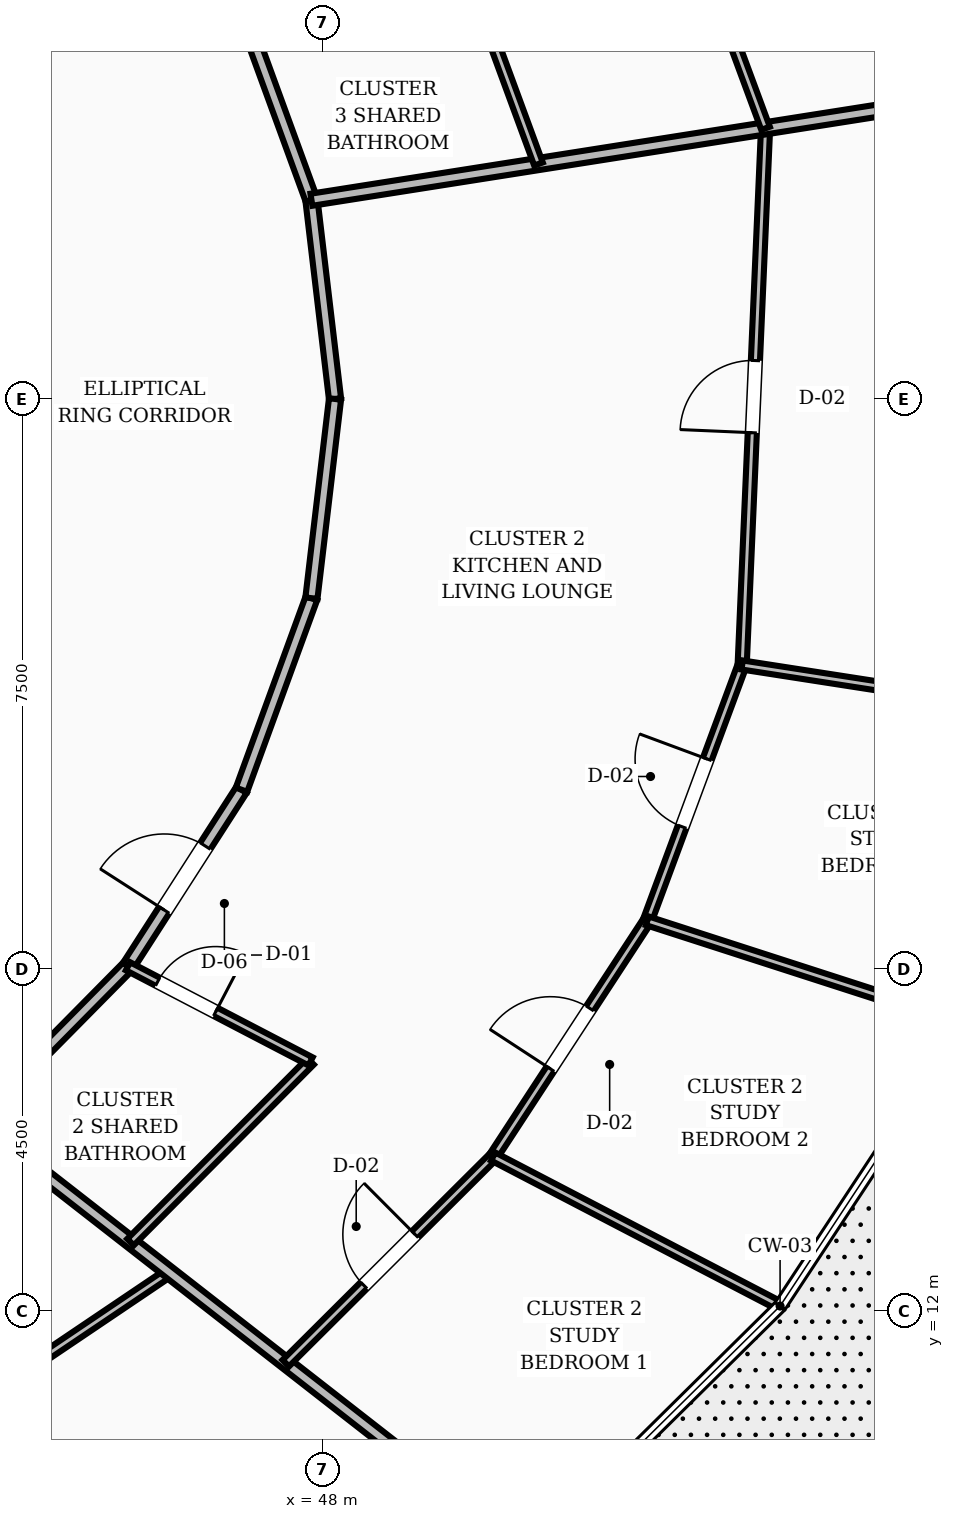
"""IFC4 building model, lengths in metres.
Left out: names, types, materials, properties, quantities, classifications, styles, units other than length and angle.
Written with IfcOpenShell. Run it as: python <this file> out.ifc"""

import sys

from ifc_helpers import new_model, si_unit, direction, frame, frame_2d, origin, place, context, subcontext, project, spatial, rectangle, extrude, element, fill, save


model = new_model("IFC4")
c1 = context("Model", 3, precision=1e-05, world=origin(), true_north=direction((0.0, 1.0)))
c2 = subcontext(c1, "Body", "Model", "MODEL_VIEW")
j1 = project(units=[si_unit("LENGTHUNIT", "METRE"), si_unit("PLANEANGLEUNIT", "RADIAN")], contexts=[c1])
p1 = place(None, origin())
s1 = spatial("IfcSite", under=j1, at=p1, CompositionType="ELEMENT")
p2 = place(p1, origin())
s2 = spatial("IfcBuilding", under=s1, at=p2, CompositionType="ELEMENT")
p3 = place(p2, frame((0.0, 0.0, 80.8)))
s3 = spatial("IfcBuildingStorey", under=s2, at=p3, CompositionType="ELEMENT", Elevation=80.8)
p4 = place(p3, frame((48.162, 24.0, 0.0), z_axis=(0.0, 0.0, 1.0), x_axis=(-0.117667763342, 0.993053018459, 0.0)))
e1 = element("IfcWall", 1, at=p4, inside=s3, PredefinedType="SOLIDWALL", context=c2, shape_type="SweptSolid", body=[
    extrude(rectangle(XDim=2.639, YDim=0.16, at=frame_2d((1.32, 0.0))), origin(), (0.0, 0.0, 1.0), 2.71),
])
p5 = place(p3, frame((47.852, 26.621, 0.0), z_axis=(0.0, 0.0, 1.0), x_axis=(-0.342882618672, 0.939378257047, 0.0)))
e2 = element("IfcWall", 2, at=p5, inside=s3, PredefinedType="SOLIDWALL", context=c2, shape_type="SweptSolid", body=[
    extrude(rectangle(XDim=2.683, YDim=0.16, at=frame_2d((1.341, 0.0))), origin(), (0.0, 0.0, 1.0), 2.71),
])
p6 = place(p3, frame((43.428, 14.501, 0.0), z_axis=(0.0, 0.0, 1.0), x_axis=(0.702569520063, 0.711615113301, 0.0)))
e3 = element("IfcWall", 3, at=p6, inside=s3, PredefinedType="SOLIDWALL", context=c2, shape_type="SweptSolid", body=[
    extrude(rectangle(XDim=2.861, YDim=0.16, at=frame_2d((1.43, 0.0))), origin(), (0.0, 0.0, 1.0), 2.71),
])
p7 = place(p3, frame((45.438, 16.537, 0.0), z_axis=(0.0, 0.0, 1.0), x_axis=(0.540891657444, 0.841092274907, 0.0)))
e4 = element("IfcWall", 4, at=p7, inside=s3, PredefinedType="SOLIDWALL", context=c2, shape_type="SweptSolid", body=[
    extrude(rectangle(XDim=2.761, YDim=0.16, at=frame_2d((1.38, 0.0))), origin(), (0.0, 0.0, 1.0), 2.71),
])
p8 = place(p7, frame((0.881, 0.0, 0.0)))
e5 = element("IfcOpeningElement", 5, at=p8, cuts=e4, PredefinedType="OPENING", context=c2, shape_type="SweptSolid", body=[
    extrude(rectangle(XDim=1.0, YDim=2.1, at=frame_2d((0.5, 1.05))), frame((0.0, 0.09, 0.0), z_axis=(0.0, -1.0, 0.0), x_axis=(1.0, 0.0, 0.0)), (0.0, 0.0, 1.0), 0.18),
])
p9 = place(p3, frame((46.932, 18.859, 0.0), z_axis=(0.0, 0.0, 1.0), x_axis=(0.342882618672, 0.939378257047, 0.0)))
e6 = element("IfcWall", 6, at=p9, inside=s3, PredefinedType="SOLIDWALL", context=c2, shape_type="SweptSolid", body=[
    extrude(rectangle(XDim=2.683, YDim=0.16, at=frame_2d((1.341, 0.0))), origin(), (0.0, 0.0, 1.0), 2.71),
])
p10 = place(p3, frame((47.852, 21.379, 0.0), z_axis=(0.0, 0.0, 1.0), x_axis=(0.117667763342, 0.993053018459, 0.0)))
e7 = element("IfcWall", 7, at=p10, inside=s3, PredefinedType="SOLIDWALL", context=c2, shape_type="SweptSolid", body=[
    extrude(rectangle(XDim=2.639, YDim=0.16, at=frame_2d((1.32, 0.0))), origin(), (0.0, 0.0, 1.0), 2.71),
])
p11 = place(p3, frame((42.985, 10.489, 0.0), z_axis=(0.0, 0.0, 1.0), x_axis=(0.829066303205, 0.55915030617, 0.0)))
e8 = element("IfcWall", 8, at=p11, inside=s3, PredefinedType="PARTITIONING", context=c2, shape_type="SweptSolid", body=[
    extrude(rectangle(XDim=3.615, YDim=0.12, at=frame_2d((1.807, 0.0))), origin(), (0.0, 0.0, 1.0), 2.71),
])
p12 = place(p3, frame((43.428, 14.501, 0.0), z_axis=(0.0, 0.0, 1.0), x_axis=(0.788578725625, -0.614933812285, 0.0)))
e9 = element("IfcWall", 9, at=p12, inside=s3, PredefinedType="SOLIDWALL", context=c2, shape_type="SweptSolid", body=[
    extrude(rectangle(XDim=9.202, YDim=0.16, at=frame_2d((4.601, 0.0))), origin(), (0.0, 0.0, 1.0), 2.71),
])
p13 = place(p3, frame((45.471, 12.908, 0.0), z_axis=(0.0, 0.0, 1.0), x_axis=(0.705905490377, 0.708306034604, 0.0)))
e10 = element("IfcWall", 10, at=p13, inside=s3, PredefinedType="PARTITIONING", context=c2, shape_type="SweptSolid", body=[
    extrude(rectangle(XDim=3.356, YDim=0.12, at=frame_2d((1.678, 0.0))), origin(), (0.0, 0.0, 1.0), 2.71),
])
p14 = place(p3, frame((45.438, 16.537, 0.0), z_axis=(0.0, 0.0, 1.0), x_axis=(0.886820978736, -0.462113137309, 0.0)))
e11 = element("IfcWall", 11, at=p14, inside=s3, PredefinedType="PARTITIONING", context=c2, shape_type="SweptSolid", body=[
    extrude(rectangle(XDim=2.709, YDim=0.12, at=frame_2d((1.354, 0.0))), origin(), (0.0, 0.0, 1.0), 2.71),
])
p15 = place(p14, frame((0.44, 0.0, 0.0)))
e12 = element("IfcOpeningElement", 12, at=p15, cuts=e11, PredefinedType="OPENING", context=c2, shape_type="SweptSolid", body=[
    extrude(rectangle(XDim=0.86, YDim=2.1, at=frame_2d((0.43, 1.05))), frame((0.0, 0.07, 0.0), z_axis=(0.0, -1.0, 0.0), x_axis=(1.0, 0.0, 0.0)), (0.0, 0.0, 1.0), 0.14),
])
p16 = place(p3, frame((47.514, 11.315, 0.0), z_axis=(0.0, 0.0, 1.0), x_axis=(0.708405005875, 0.705806168613, 0.0)))
e13 = element("IfcWall", 13, at=p16, inside=s3, PredefinedType="PARTITIONING", context=c2, shape_type="SweptSolid", body=[
    extrude(rectangle(XDim=3.852, YDim=0.12, at=frame_2d((1.926, 0.0))), origin(), (0.0, 0.0, 1.0), 2.71),
])
p17 = place(p16, frame((1.451, 0.0, 0.0)))
e14 = element("IfcOpeningElement", 14, at=p17, cuts=e13, PredefinedType="OPENING", context=c2, shape_type="SweptSolid", body=[
    extrude(rectangle(XDim=0.95, YDim=2.1, at=frame_2d((0.475, 1.05))), frame((0.0, 0.07, 0.0), z_axis=(0.0, -1.0, 0.0), x_axis=(1.0, 0.0, 0.0)), (0.0, 0.0, 1.0), 0.14),
])
p18 = place(p3, frame((50.242, 14.033, 0.0), z_axis=(0.0, 0.0, 1.0), x_axis=(0.547181905029, 0.837013717217, 0.0)))
e15 = element("IfcWall", 15, at=p18, inside=s3, PredefinedType="PARTITIONING", context=c2, shape_type="SweptSolid", body=[
    extrude(rectangle(XDim=3.706, YDim=0.12, at=frame_2d((1.853, 0.0))), origin(), (0.0, 0.0, 1.0), 2.71),
])
p19 = place(p18, frame((1.378, 0.0, 0.0)))
e16 = element("IfcOpeningElement", 16, at=p19, cuts=e15, PredefinedType="OPENING", context=c2, shape_type="SweptSolid", body=[
    extrude(rectangle(XDim=0.95, YDim=2.1, at=frame_2d((0.475, 1.05))), frame((0.0, 0.07, 0.0), z_axis=(0.0, -1.0, 0.0), x_axis=(1.0, 0.0, 0.0)), (0.0, 0.0, 1.0), 0.14),
])
p20 = place(p3, frame((50.242, 14.033, 0.0), z_axis=(0.0, 0.0, 1.0), x_axis=(0.886850665811, -0.462056161684, 0.0)))
e17 = element("IfcWall", 17, at=p20, inside=s3, PredefinedType="PARTITIONING", context=c2, shape_type="SweptSolid", body=[
    extrude(rectangle(XDim=4.207, YDim=0.12, at=frame_2d((2.103, 0.0))), origin(), (0.0, 0.0, 1.0), 2.71),
])
p21 = place(p3, frame((52.27, 17.135, 0.0), z_axis=(0.0, 0.0, 1.0), x_axis=(0.347819358627, 0.937561567986, 0.0)))
e18 = element("IfcWall", 18, at=p21, inside=s3, PredefinedType="PARTITIONING", context=c2, shape_type="SweptSolid", body=[
    extrude(rectangle(XDim=3.59, YDim=0.12, at=frame_2d((1.795, 0.0))), origin(), (0.0, 0.0, 1.0), 2.71),
])
p22 = place(p21, frame((1.32, 0.0, 0.0)))
e19 = element("IfcOpeningElement", 19, at=p22, cuts=e18, PredefinedType="OPENING", context=c2, shape_type="SweptSolid", body=[
    extrude(rectangle(XDim=0.95, YDim=2.1, at=frame_2d((0.475, 1.05))), frame((0.0, 0.07, 0.0), z_axis=(0.0, -1.0, 0.0), x_axis=(1.0, 0.0, 0.0)), (0.0, 0.0, 1.0), 0.14),
])
p23 = place(p3, frame((52.27, 17.135, 0.0), z_axis=(0.0, 0.0, 1.0), x_axis=(0.951594494346, -0.307356337709, 0.0)))
e20 = element("IfcWall", 20, at=p23, inside=s3, PredefinedType="PARTITIONING", context=c2, shape_type="SweptSolid", body=[
    extrude(rectangle(XDim=4.358, YDim=0.12, at=frame_2d((2.179, 0.0))), origin(), (0.0, 0.0, 1.0), 2.71),
])
p24 = place(p3, frame((53.519, 20.5, 0.0), z_axis=(0.0, 0.0, 1.0), x_axis=(0.043525670249, 0.999052308956, 0.0)))
e21 = element("IfcWall", 21, at=p24, inside=s3, PredefinedType="PARTITIONING", context=c2, shape_type="SweptSolid", body=[
    extrude(rectangle(XDim=7.067, YDim=0.12, at=frame_2d((3.534, 0.0))), origin(), (0.0, 0.0, 1.0), 2.71),
])
p25 = place(p24, frame((3.059, 0.0, 0.0)))
e22 = element("IfcOpeningElement", 22, at=p25, cuts=e21, PredefinedType="OPENING", context=c2, shape_type="SweptSolid", body=[
    extrude(rectangle(XDim=0.95, YDim=2.1, at=frame_2d((0.475, 1.05))), frame((0.0, 0.07, 0.0), z_axis=(0.0, -1.0, 0.0), x_axis=(1.0, 0.0, 0.0)), (0.0, 0.0, 1.0), 0.14),
])
p26 = place(p3, frame((53.519, 20.5, 0.0), z_axis=(0.0, 0.0, 1.0), x_axis=(0.988179628111, -0.153300432438, 0.0)))
e23 = element("IfcWall", 23, at=p26, inside=s3, PredefinedType="PARTITIONING", context=c2, shape_type="SweptSolid", body=[
    extrude(rectangle(XDim=4.456, YDim=0.12, at=frame_2d((2.228, 0.0))), origin(), (0.0, 0.0, 1.0), 2.71),
])
p27 = place(p3, frame((47.852, 26.621, 0.0), z_axis=(0.0, 0.0, 1.0), x_axis=(0.987843119508, 0.155454080811, 0.0)))
e24 = element("IfcWall", 24, at=p27, inside=s3, PredefinedType="SOLIDWALL", context=c2, shape_type="SweptSolid", body=[
    extrude(rectangle(XDim=10.75, YDim=0.16, at=frame_2d((5.375, 0.0))), origin(), (0.0, 0.0, 1.0), 2.71),
])
p28 = place(p3, frame((50.839, 27.091, 0.0), z_axis=(0.0, 0.0, 1.0), x_axis=(-0.34521944279, 0.938521995651, 0.0)))
e25 = element("IfcWall", 25, at=p28, inside=s3, PredefinedType="PARTITIONING", context=c2, shape_type="SweptSolid", body=[
    extrude(rectangle(XDim=3.167, YDim=0.12, at=frame_2d((1.583, 0.0))), origin(), (0.0, 0.0, 1.0), 2.71),
])
p29 = place(p3, frame((53.826, 27.561, 0.0), z_axis=(0.0, 0.0, 1.0), x_axis=(-0.346876529869, 0.937910802276, 0.0)))
e26 = element("IfcWall", 26, at=p29, inside=s3, PredefinedType="PARTITIONING", context=c2, shape_type="SweptSolid", body=[
    extrude(rectangle(XDim=3.651, YDim=0.12, at=frame_2d((1.825, 0.0))), origin(), (0.0, 0.0, 1.0), 2.71),
])
p30 = place(p29, frame((1.35, 0.0, 0.0)))
e27 = element("IfcOpeningElement", 27, at=p30, cuts=e26, PredefinedType="OPENING", context=c2, shape_type="SweptSolid", body=[
    extrude(rectangle(XDim=0.95, YDim=2.1, at=frame_2d((0.475, 1.05))), frame((0.0, 0.07, 0.0), z_axis=(0.0, -1.0, 0.0), x_axis=(1.0, 0.0, 0.0)), (0.0, 0.0, 1.0), 0.14),
])
p31 = place(p15, origin())
e28 = element("IfcDoor", 28, at=p31, inside=s3, OperationType="SINGLE_SWING_RIGHT", PredefinedType="DOOR", context=c2, shape_type="SweptSolid", body=[
    extrude(rectangle(XDim=0.86, YDim=2.1, at=frame_2d((0.43, 1.05))), frame((0.0, 0.025, 0.0), z_axis=(0.0, -1.0, 0.0), x_axis=(1.0, 0.0, 0.0)), (0.0, 0.0, 1.0), 0.05),
])
fill(e12, e28)
p32 = place(p8, origin())
e29 = element("IfcDoor", 29, at=p32, inside=s3, OperationType="SINGLE_SWING_LEFT", PredefinedType="DOOR", context=c2, shape_type="SweptSolid", body=[
    extrude(rectangle(XDim=1.0, YDim=2.1, at=frame_2d((0.5, 1.05))), frame((0.0, 0.025, 0.0), z_axis=(0.0, -1.0, 0.0), x_axis=(1.0, 0.0, 0.0)), (0.0, 0.0, 1.0), 0.05),
])
fill(e5, e29)
p33 = place(p17, origin())
e30 = element("IfcDoor", 30, at=p33, inside=s3, OperationType="SINGLE_SWING_RIGHT", PredefinedType="DOOR", context=c2, shape_type="SweptSolid", body=[
    extrude(rectangle(XDim=0.95, YDim=2.1, at=frame_2d((0.475, 1.05))), frame((0.0, 0.025, 0.0), z_axis=(0.0, -1.0, 0.0), x_axis=(1.0, 0.0, 0.0)), (0.0, 0.0, 1.0), 0.05),
])
fill(e14, e30)
p34 = place(p19, origin())
e31 = element("IfcDoor", 31, at=p34, inside=s3, OperationType="SINGLE_SWING_LEFT", PredefinedType="DOOR", context=c2, shape_type="SweptSolid", body=[
    extrude(rectangle(XDim=0.95, YDim=2.1, at=frame_2d((0.475, 1.05))), frame((0.0, 0.025, 0.0), z_axis=(0.0, -1.0, 0.0), x_axis=(1.0, 0.0, 0.0)), (0.0, 0.0, 1.0), 0.05),
])
fill(e16, e31)
p35 = place(p22, origin())
e32 = element("IfcDoor", 32, at=p35, inside=s3, OperationType="SINGLE_SWING_RIGHT", PredefinedType="DOOR", context=c2, shape_type="SweptSolid", body=[
    extrude(rectangle(XDim=0.95, YDim=2.1, at=frame_2d((0.475, 1.05))), frame((0.0, 0.025, 0.0), z_axis=(0.0, -1.0, 0.0), x_axis=(1.0, 0.0, 0.0)), (0.0, 0.0, 1.0), 0.05),
])
fill(e19, e32)
p36 = place(p25, origin())
e33 = element("IfcDoor", 33, at=p36, inside=s3, OperationType="SINGLE_SWING_LEFT", PredefinedType="DOOR", context=c2, shape_type="SweptSolid", body=[
    extrude(rectangle(XDim=0.95, YDim=2.1, at=frame_2d((0.475, 1.05))), frame((0.0, 0.025, 0.0), z_axis=(0.0, -1.0, 0.0), x_axis=(1.0, 0.0, 0.0)), (0.0, 0.0, 1.0), 0.05),
])
fill(e22, e33)
save(model, sys.argv[1])
